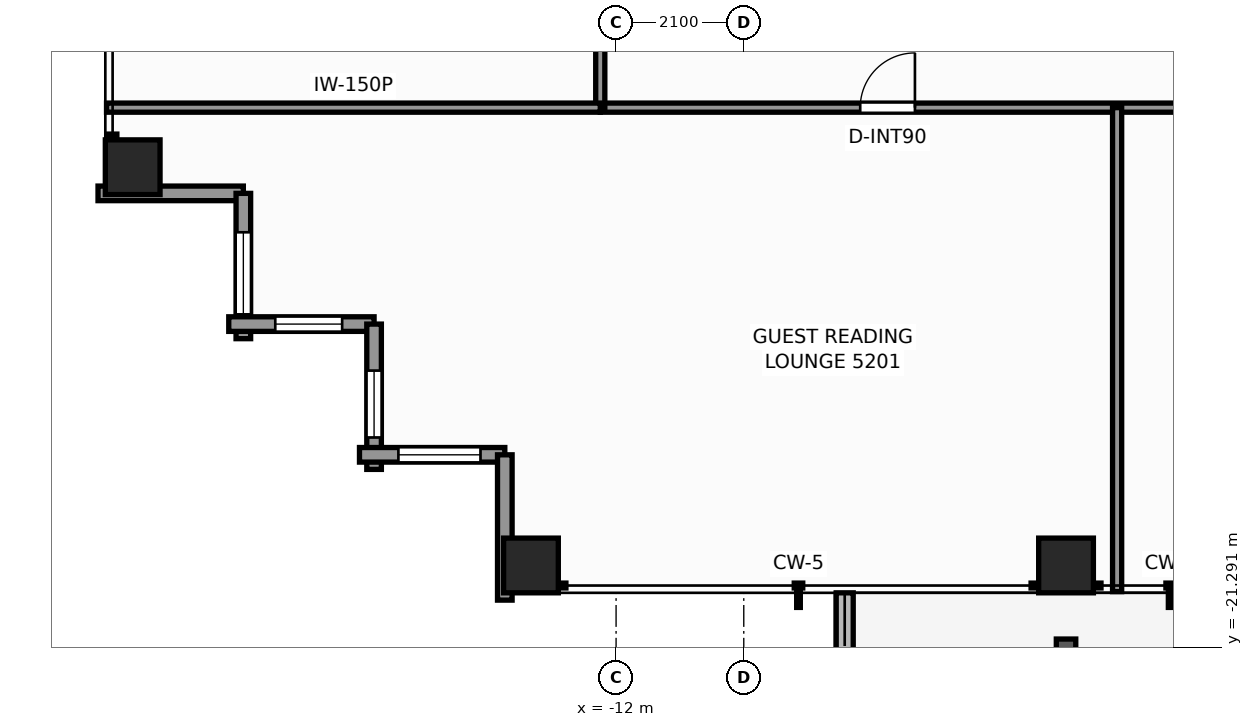
"""IFC4 building model, lengths in metres.
Left out: names, types, materials, properties, quantities, classifications, styles, units other than length and angle.
Written with IfcOpenShell. Run it as: python <this file> out.ifc"""

import sys

from ifc_helpers import new_model, si_unit, direction, frame, frame_2d, origin, origin_2d, place, context, subcontext, project, spatial, rectangle, extrude, element, fill, save


model = new_model("IFC4")
c1 = context("Model", 3, precision=1e-05, world=origin(), true_north=direction((0.0, 1.0)))
c2 = subcontext(c1, "Body", "Model", "MODEL_VIEW")
j1 = project(units=[si_unit("LENGTHUNIT", "METRE"), si_unit("PLANEANGLEUNIT", "RADIAN")], contexts=[c1])
p1 = place(None, origin())
s1 = spatial("IfcSite", under=j1, at=p1, CompositionType="ELEMENT")
p2 = place(p1, origin())
s2 = spatial("IfcBuilding", under=s1, at=p2, CompositionType="ELEMENT")
p3 = place(p2, frame((0.0, 0.0, 180.0)))
s3 = spatial("IfcBuildingStorey", under=s2, at=p3, CompositionType="ELEMENT", Elevation=180.0)
for number, where, z_axis, x_axis in (
    (1, (-13.4, -19.95, 0.0), (0.0, 0.0, 1.0), (1.0, 0.0, 0.0)),
    (2, (-4.6, -19.95, 0.0), (0.0, 0.0, 1.0), (1.0, 0.0, 0.0)),
    (3, (-19.95, -13.4, 0.0), (0.0, 0.0, 1.0), (1.0, 0.0, 0.0)),
):
    element("IfcColumn", number, at=place(p3, frame(where, z_axis=z_axis, x_axis=x_axis)), inside=s3, PredefinedType="COLUMN", context=c2, shape_type="SweptSolid", body=[
        extrude(rectangle(XDim=0.9, YDim=0.9, at=origin_2d()), origin(), (0.0, 0.0, 1.0), 3.3),
    ])
p4 = place(p3, frame((-8.24, -20.4, -0.04), z_axis=(0.0, 0.0, 1.0), x_axis=(0.0, -1.0, 0.0)))
e4 = element("IfcWall", 4, at=p4, inside=s3, PredefinedType="PARAPET", context=c2, shape_type="SweptSolid", body=[
    extrude(rectangle(XDim=1.466, YDim=0.28, at=frame_2d((0.733, 0.0))), origin(), (0.0, 0.0, 1.0), 0.42),
])
p5 = place(p3, frame((-18.13, -13.83, 0.0), z_axis=(0.0, 0.0, 1.0), x_axis=(-1.0, 0.0, 0.0)))
e5 = element("IfcWall", 5, at=p5, inside=s3, PredefinedType="STANDARD", context=c2, shape_type="SweptSolid", body=[
    extrude(rectangle(XDim=2.39, YDim=0.24, at=frame_2d((1.195, 0.0))), origin(), (0.0, 0.0, 1.0), 2.463),
])
p6 = place(p3, frame((-18.13, -16.22, 0.0), z_axis=(0.0, 0.0, 1.0), x_axis=(0.0, 1.0, 0.0)))
e6 = element("IfcWall", 6, at=p6, inside=s3, PredefinedType="STANDARD", context=c2, shape_type="SweptSolid", body=[
    extrude(rectangle(XDim=2.39, YDim=0.24, at=frame_2d((1.195, 0.0))), origin(), (0.0, 0.0, 1.0), 2.463),
])
p7 = place(p6, frame((0.4, 0.0, 0.65)))
e7 = element("IfcOpeningElement", 7, at=p7, cuts=e6, PredefinedType="OPENING", context=c2, shape_type="SweptSolid", body=[
    extrude(rectangle(XDim=1.35, YDim=1.55, at=frame_2d((0.675, 0.775))), frame((0.0, 0.13, 0.0), z_axis=(0.0, -1.0, 0.0), x_axis=(1.0, 0.0, 0.0)), (0.0, 0.0, 1.0), 0.26),
])
p8 = place(p3, frame((-15.98, -15.98, 0.0), z_axis=(0.0, 0.0, 1.0), x_axis=(-1.0, 0.0, 0.0)))
e8 = element("IfcWall", 8, at=p8, inside=s3, PredefinedType="STANDARD", context=c2, shape_type="SweptSolid", body=[
    extrude(rectangle(XDim=2.39, YDim=0.24, at=frame_2d((1.195, 0.0))), origin(), (0.0, 0.0, 1.0), 2.463),
])
p9 = place(p8, frame((0.525, 0.0, 0.65)))
e9 = element("IfcOpeningElement", 9, at=p9, cuts=e8, PredefinedType="OPENING", context=c2, shape_type="SweptSolid", body=[
    extrude(rectangle(XDim=1.1, YDim=1.45, at=frame_2d((0.55, 0.725))), frame((0.0, 0.13, 0.0), z_axis=(0.0, -1.0, 0.0), x_axis=(1.0, 0.0, 0.0)), (0.0, 0.0, 1.0), 0.26),
])
p10 = place(p3, frame((-15.98, -18.37, 0.0), z_axis=(0.0, 0.0, 1.0), x_axis=(0.0, 1.0, 0.0)))
e10 = element("IfcWall", 10, at=p10, inside=s3, PredefinedType="STANDARD", context=c2, shape_type="SweptSolid", body=[
    extrude(rectangle(XDim=2.39, YDim=0.24, at=frame_2d((1.195, 0.0))), origin(), (0.0, 0.0, 1.0), 2.463),
])
p11 = place(p10, frame((0.525, 0.0, 0.65)))
e11 = element("IfcOpeningElement", 11, at=p11, cuts=e10, PredefinedType="OPENING", context=c2, shape_type="SweptSolid", body=[
    extrude(rectangle(XDim=1.1, YDim=1.45, at=frame_2d((0.55, 0.725))), frame((0.0, 0.13, 0.0), z_axis=(0.0, -1.0, 0.0), x_axis=(1.0, 0.0, 0.0)), (0.0, 0.0, 1.0), 0.26),
])
p12 = place(p3, frame((-13.83, -18.13, 0.0), z_axis=(0.0, 0.0, 1.0), x_axis=(-1.0, 0.0, 0.0)))
e12 = element("IfcWall", 12, at=p12, inside=s3, PredefinedType="STANDARD", context=c2, shape_type="SweptSolid", body=[
    extrude(rectangle(XDim=2.39, YDim=0.24, at=frame_2d((1.195, 0.0))), origin(), (0.0, 0.0, 1.0), 2.463),
])
p13 = place(p12, frame((0.4, 0.0, 0.65)))
e13 = element("IfcOpeningElement", 13, at=p13, cuts=e12, PredefinedType="OPENING", context=c2, shape_type="SweptSolid", body=[
    extrude(rectangle(XDim=1.35, YDim=1.55, at=frame_2d((0.675, 0.775))), frame((0.0, 0.13, 0.0), z_axis=(0.0, -1.0, 0.0), x_axis=(1.0, 0.0, 0.0)), (0.0, 0.0, 1.0), 0.26),
])
p14 = place(p3, frame((-13.83, -20.52, 0.0), z_axis=(0.0, 0.0, 1.0), x_axis=(0.0, 1.0, 0.0)))
e14 = element("IfcWall", 14, at=p14, inside=s3, PredefinedType="STANDARD", context=c2, shape_type="SweptSolid", body=[
    extrude(rectangle(XDim=2.39, YDim=0.24, at=frame_2d((1.195, 0.0))), origin(), (0.0, 0.0, 1.0), 2.463),
])
p15 = place(p3, frame((-12.26, -12.42, 0.0), z_axis=(0.0, 0.0, 1.0), x_axis=(1.0, 0.0, 0.0)))
e15 = element("IfcWall", 15, at=p15, inside=s3, PredefinedType="PARTITIONING", context=c2, shape_type="SweptSolid", body=[
    extrude(rectangle(XDim=24.84, YDim=0.15, at=frame_2d((12.42, 0.0))), origin(), (0.0, 0.0, 1.0), 2.369),
])
p16 = place(p15, frame((4.275, 0.0, 0.0)))
e16 = element("IfcOpeningElement", 16, at=p16, cuts=e15, PredefinedType="OPENING", context=c2, shape_type="SweptSolid", body=[
    extrude(rectangle(XDim=0.9, YDim=2.06, at=frame_2d((0.45, 1.03))), frame((0.0, 0.085, 0.0), z_axis=(0.0, -1.0, 0.0), x_axis=(1.0, 0.0, 0.0)), (0.0, 0.0, 1.0), 0.17),
])
p17 = place(p15, frame((13.84, 0.0, 0.0)))
e17 = element("IfcOpeningElement", 17, at=p17, cuts=e15, PredefinedType="OPENING", context=c2, shape_type="SweptSolid", body=[
    extrude(rectangle(XDim=0.9, YDim=2.06, at=frame_2d((0.45, 1.03))), frame((0.0, 0.085, 0.0), z_axis=(0.0, -1.0, 0.0), x_axis=(1.0, 0.0, 0.0)), (0.0, 0.0, 1.0), 0.17),
])
p18 = place(p15, frame((19.345, 0.0, 0.0)))
e18 = element("IfcOpeningElement", 18, at=p18, cuts=e15, PredefinedType="OPENING", context=c2, shape_type="SweptSolid", body=[
    extrude(rectangle(XDim=0.9, YDim=2.06, at=frame_2d((0.45, 1.03))), frame((0.0, 0.085, 0.0), z_axis=(0.0, -1.0, 0.0), x_axis=(1.0, 0.0, 0.0)), (0.0, 0.0, 1.0), 0.17),
])
p19 = place(p3, frame((-12.26, -12.42, 0.0), z_axis=(0.0, 0.0, 1.0), x_axis=(0.0, 1.0, 0.0)))
e19 = element("IfcWall", 19, at=p19, inside=s3, PredefinedType="PARTITIONING", context=c2, shape_type="SweptSolid", body=[
    extrude(rectangle(XDim=24.84, YDim=0.15, at=frame_2d((12.42, 0.0))), origin(), (0.0, 0.0, 1.0), 2.369),
])
p20 = place(p19, frame((4.41, 0.0, 0.0)))
e20 = element("IfcOpeningElement", 20, at=p20, cuts=e19, PredefinedType="OPENING", context=c2, shape_type="SweptSolid", body=[
    extrude(rectangle(XDim=0.95, YDim=2.06, at=frame_2d((0.475, 1.03))), frame((0.0, 0.085, 0.0), z_axis=(0.0, -1.0, 0.0), x_axis=(1.0, 0.0, 0.0)), (0.0, 0.0, 1.0), 0.17),
])
p21 = place(p19, frame((14.375, 0.0, 0.0)))
e21 = element("IfcOpeningElement", 21, at=p21, cuts=e19, PredefinedType="OPENING", context=c2, shape_type="SweptSolid", body=[
    extrude(rectangle(XDim=0.95, YDim=2.06, at=frame_2d((0.475, 1.03))), frame((0.0, 0.085, 0.0), z_axis=(0.0, -1.0, 0.0), x_axis=(1.0, 0.0, 0.0)), (0.0, 0.0, 1.0), 0.17),
])
p22 = place(p19, frame((18.322, 0.0, 0.0)))
e22 = element("IfcOpeningElement", 22, at=p22, cuts=e19, PredefinedType="OPENING", context=c2, shape_type="SweptSolid", body=[
    extrude(rectangle(XDim=0.9, YDim=2.06, at=frame_2d((0.45, 1.03))), frame((0.0, 0.085, 0.0), z_axis=(0.0, -1.0, 0.0), x_axis=(1.0, 0.0, 0.0)), (0.0, 0.0, 1.0), 0.17),
])
p23 = place(p19, frame((20.442, 0.0, 0.0)))
e23 = element("IfcOpeningElement", 23, at=p23, cuts=e19, PredefinedType="OPENING", context=c2, shape_type="SweptSolid", body=[
    extrude(rectangle(XDim=0.95, YDim=2.06, at=frame_2d((0.475, 1.03))), frame((0.0, 0.085, 0.0), z_axis=(0.0, -1.0, 0.0), x_axis=(1.0, 0.0, 0.0)), (0.0, 0.0, 1.0), 0.17),
])
p24 = place(p3, frame((-20.38, -12.42, 0.0), z_axis=(0.0, 0.0, 1.0), x_axis=(1.0, 0.0, 0.0)))
e24 = element("IfcWall", 24, at=p24, inside=s3, PredefinedType="PARTITIONING", context=c2, shape_type="SweptSolid", body=[
    extrude(rectangle(XDim=8.12, YDim=0.15, at=frame_2d((4.06, 0.0))), origin(), (0.0, 0.0, 1.0), 2.369),
])
p25 = place(p3, frame((-3.76, -20.38, 0.0), z_axis=(0.0, 0.0, 1.0), x_axis=(0.0, 1.0, 0.0)))
e25 = element("IfcWall", 25, at=p25, inside=s3, PredefinedType="PARTITIONING", context=c2, shape_type="SweptSolid", body=[
    extrude(rectangle(XDim=7.96, YDim=0.15, at=frame_2d((3.98, 0.0))), origin(), (0.0, 0.0, 1.0), 2.453),
])
p26 = place(p7, origin())
e26 = element("IfcWindow", 26, at=p26, inside=s3, PartitioningType="SINGLE_PANEL", PredefinedType="WINDOW", context=c2, shape_type="SweptSolid", body=[
    extrude(rectangle(XDim=1.35, YDim=1.55, at=frame_2d((0.675, 0.775))), frame((0.0, 0.03, 0.0), z_axis=(0.0, -1.0, 0.0), x_axis=(1.0, 0.0, 0.0)), (0.0, 0.0, 1.0), 0.06),
])
fill(e7, e26)
p27 = place(p9, origin())
e27 = element("IfcWindow", 27, at=p27, inside=s3, PartitioningType="SINGLE_PANEL", PredefinedType="WINDOW", context=c2, shape_type="SweptSolid", body=[
    extrude(rectangle(XDim=1.1, YDim=1.45, at=frame_2d((0.55, 0.725))), frame((0.0, 0.03, 0.0), z_axis=(0.0, -1.0, 0.0), x_axis=(1.0, 0.0, 0.0)), (0.0, 0.0, 1.0), 0.06),
])
fill(e9, e27)
p28 = place(p11, origin())
e28 = element("IfcWindow", 28, at=p28, inside=s3, PartitioningType="SINGLE_PANEL", PredefinedType="WINDOW", context=c2, shape_type="SweptSolid", body=[
    extrude(rectangle(XDim=1.1, YDim=1.45, at=frame_2d((0.55, 0.725))), frame((0.0, 0.03, 0.0), z_axis=(0.0, -1.0, 0.0), x_axis=(1.0, 0.0, 0.0)), (0.0, 0.0, 1.0), 0.06),
])
fill(e11, e28)
p29 = place(p13, origin())
e29 = element("IfcWindow", 29, at=p29, inside=s3, PartitioningType="SINGLE_PANEL", PredefinedType="WINDOW", context=c2, shape_type="SweptSolid", body=[
    extrude(rectangle(XDim=1.35, YDim=1.55, at=frame_2d((0.675, 0.775))), frame((0.0, 0.03, 0.0), z_axis=(0.0, -1.0, 0.0), x_axis=(1.0, 0.0, 0.0)), (0.0, 0.0, 1.0), 0.06),
])
fill(e13, e29)
p30 = place(p16, origin())
e30 = element("IfcDoor", 30, at=p30, inside=s3, OperationType="SINGLE_SWING_RIGHT", PredefinedType="DOOR", context=c2, shape_type="SweptSolid", body=[
    extrude(rectangle(XDim=0.9, YDim=2.06, at=frame_2d((0.45, 1.03))), frame((0.0, 0.025, 0.0), z_axis=(0.0, -1.0, 0.0), x_axis=(1.0, 0.0, 0.0)), (0.0, 0.0, 1.0), 0.05),
])
fill(e16, e30)
save(model, sys.argv[1])
